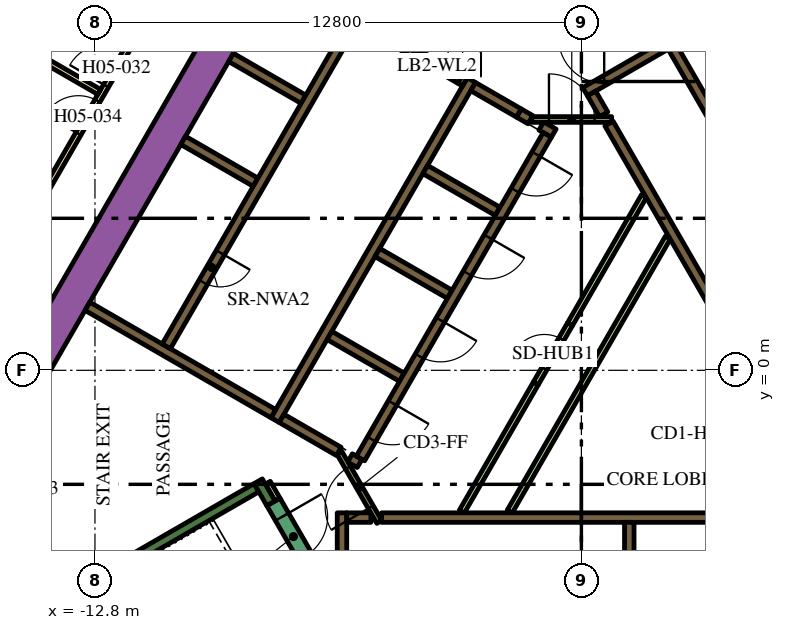
"""IFC4 building model, lengths in metres.
Left out: names, types, materials, properties, quantities, classifications, styles, units other than length and angle.
Written with IfcOpenShell. Run it as: python <this file> out.ifc"""

import sys

from ifc_helpers import new_model, si_unit, direction, frame, frame_2d, origin, place, context, subcontext, project, spatial, polyline, rectangle, outline, extrude, element, fill, save


model = new_model("IFC4")
c1 = context("Model", 3, precision=1e-05, world=origin(), true_north=direction((0.0, 1.0)))
c2 = subcontext(c1, "Body", "Model", "MODEL_VIEW")
j1 = project(units=[si_unit("LENGTHUNIT", "METRE"), si_unit("PLANEANGLEUNIT", "RADIAN")], contexts=[c1])
p1 = place(None, origin())
s1 = spatial("IfcSite", under=j1, at=p1, CompositionType="ELEMENT")
p2 = place(p1, origin())
s2 = spatial("IfcBuilding", under=s1, at=p2, CompositionType="ELEMENT")
p3 = place(p2, frame((0.0, 0.0, 74.4)))
s3 = spatial("IfcBuildingStorey", under=s2, at=p3, CompositionType="ELEMENT", Elevation=74.4)
p4 = place(p3, frame((-15.36, -1.503, 0.0), z_axis=(0.0, 0.0, 1.0), x_axis=(0.50000389221, 0.866023156604, 0.0)))
e1 = element("IfcWall", 1, at=p4, inside=s3, PredefinedType="SOLIDWALL", context=c2, shape_type="SweptSolid", body=[
    extrude(rectangle(XDim=21.0, YDim=0.9, at=frame_2d((10.5, 0.0))), origin(), (0.0, 0.0, 1.0), 3.9),
])
p5 = place(p3, frame((-12.134, -11.883, 0.0), z_axis=(0.0, 0.0, 1.0), x_axis=(-0.500005339912, 0.866022320763, 0.0)))
e2 = element("IfcWall", 2, at=p5, inside=s3, PredefinedType="SOLIDWALL", context=c2, shape_type="SweptSolid", body=[
    extrude(rectangle(XDim=9.488, YDim=0.9, at=frame_2d((4.744, 0.0))), origin(), (0.0, 0.0, 1.0), 3.9),
])
p6 = place(p3, frame((-14.44, -6.49, 0.0), z_axis=(0.0, 0.0, 1.0), x_axis=(0.866022966069, 0.500004222222, 0.0)))
e3 = element("IfcWall", 3, at=p6, inside=s3, PredefinedType="SOLIDWALL", context=c2, shape_type="SweptSolid", body=[
    extrude(rectangle(XDim=6.8, YDim=0.25, at=frame_2d((3.4, 0.0))), origin(), (0.0, 0.0, 1.0), 3.9),
])
p7 = place(p3, frame((-8.168, -3.503, 0.0), z_axis=(0.0, 0.0, 1.0), x_axis=(-0.499952099219, 0.866053057547, 0.0)))
e4 = element("IfcWall", 4, at=p7, inside=s3, PredefinedType="SOLIDWALL", context=c2, shape_type="SweptSolid", body=[
    extrude(rectangle(XDim=0.675, YDim=0.25, at=frame_2d((0.337, 0.0))), origin(), (0.0, 0.0, 1.0), 3.9),
])
p8 = place(p3, frame((-5.259, -3.875, 0.0), z_axis=(0.0, 0.0, 1.0), x_axis=(1.0, 0.0, 0.0)))
e5 = element("IfcWall", 5, at=p8, inside=s3, PredefinedType="SOLIDWALL", context=c2, shape_type="SweptSolid", body=[
    extrude(rectangle(XDim=10.489, YDim=0.25, at=frame_2d((5.244, 0.0))), origin(), (0.0, 0.0, 1.0), 3.9),
])
p9 = place(p3, frame((1.26, -4.0, 0.0), z_axis=(0.0, 0.0, 1.0), x_axis=(0.0, -1.0, 0.0)))
e6 = element("IfcWall", 6, at=p9, inside=s3, PredefinedType="SOLIDWALL", context=c2, shape_type="SweptSolid", body=[
    extrude(rectangle(XDim=2.2, YDim=0.25, at=frame_2d((1.1, 0.0))), origin(), (0.0, 0.0, 1.0), 3.9),
])
p10 = place(p3, frame((-6.3, -7.035, 0.0), z_axis=(0.0, 0.0, 1.0), x_axis=(0.0, 1.0, 0.0)))
e7 = element("IfcWall", 7, at=p10, inside=s3, PredefinedType="SOLIDWALL", context=c2, shape_type="SweptSolid", body=[
    extrude(rectangle(XDim=3.285, YDim=0.25, at=frame_2d((1.643, 0.0))), origin(), (0.0, 0.0, 1.0), 3.9),
])
p11 = place(p3, frame((-6.175, -3.875, 0.0), z_axis=(0.0, 0.0, 1.0), x_axis=(1.0, 0.0, 0.0)))
e8 = element("IfcWall", 8, at=p11, inside=s3, PredefinedType="SOLIDWALL", context=c2, shape_type="SweptSolid", body=[
    extrude(rectangle(XDim=0.637, YDim=0.25, at=frame_2d((0.318, 0.0))), origin(), (0.0, 0.0, 1.0), 3.9),
])
p12 = place(p3, frame((0.098, 7.331, 0.0), z_axis=(0.0, 0.0, 1.0), x_axis=(0.865988154826, 0.50006451154, 0.0)))
e9 = element("IfcWall", 9, at=p12, inside=s3, PredefinedType="SOLIDWALL", context=c2, shape_type="SweptSolid", body=[
    extrude(rectangle(XDim=3.398, YDim=0.25, at=frame_2d((1.699, 0.0))), origin(), (0.0, 0.0, 1.0), 3.9),
])
p13 = place(p3, frame((0.268, 7.285, 0.0), z_axis=(0.0, 0.0, 1.0), x_axis=(0.500098681536, -0.865968422476, 0.0)))
e10 = element("IfcWall", 10, at=p13, inside=s3, PredefinedType="SOLIDWALL", context=c2, shape_type="SweptSolid", body=[
    extrude(rectangle(XDim=0.636, YDim=0.25, at=frame_2d((0.318, 0.0))), origin(), (0.0, 0.0, 1.0), 3.9),
])
p14 = place(p3, frame((5.97, -2.591, 0.0), z_axis=(0.0, 0.0, 1.0), x_axis=(-0.499994469932, 0.866028596547, 0.0)))
e11 = element("IfcWall", 11, at=p14, inside=s3, PredefinedType="SOLIDWALL", context=c2, shape_type="SweptSolid", body=[
    extrude(rectangle(XDim=10.488, YDim=0.25, at=frame_2d((5.244, 0.0))), origin(), (0.0, 0.0, 1.0), 3.9),
])
p15 = place(p3, frame((-8.06, -1.311, 0.0), z_axis=(0.0, 0.0, 1.0), x_axis=(0.50000273126, 0.866023826885, 0.0)))
e12 = element("IfcWall", 12, at=p15, inside=s3, PredefinedType="SOLIDWALL", context=c2, shape_type="SweptSolid", body=[
    extrude(rectangle(XDim=10.33, YDim=0.25, at=frame_2d((5.165, 0.0))), origin(), (0.0, 0.0, 1.0), 3.9),
])
p16 = place(p3, frame((-1.342, 6.595, 0.0), z_axis=(0.0, 0.0, 1.0), x_axis=(-0.866046247233, 0.49996389635, 0.0)))
e13 = element("IfcWall", 13, at=p16, inside=s3, PredefinedType="SOLIDWALL", context=c2, shape_type="SweptSolid", body=[
    extrude(rectangle(XDim=0.35, YDim=0.25, at=frame_2d((0.175, 0.0))), origin(), (0.0, 0.0, 1.0), 3.9),
])
p17 = place(p3, frame((-1.647, 6.771, 0.0), z_axis=(0.0, 0.0, 1.0), x_axis=(-0.865971728693, 0.500092956464, 0.0)))
e14 = element("IfcWall", 14, at=p17, inside=s3, PredefinedType="SOLIDWALL", context=c2, shape_type="SweptSolid", body=[
    extrude(rectangle(XDim=1.388, YDim=0.25, at=frame_2d((0.694, 0.0))), origin(), (0.0, 0.0, 1.0), 3.9),
])
p18 = place(p3, frame((-0.728, 6.24, 0.0), z_axis=(0.0, 0.0, 1.0), x_axis=(-0.866088799389, 0.499890179513, 0.0)))
e15 = element("IfcWall", 15, at=p18, inside=s3, PredefinedType="SOLIDWALL", context=c2, shape_type="SweptSolid", body=[
    extrude(rectangle(XDim=0.378, YDim=0.25, at=frame_2d((0.189, 0.0))), origin(), (0.0, 0.0, 1.0), 3.9),
])
for number, where, z_axis, x_axis in (
    (16, (-2.204, 4.182, 0.0), (0.0, 0.0, 1.0), (-0.866, 0.5, 0.0)),
    (17, (-5.369, 3.1, 0.0), (0.0, 0.0, 1.0), (0.866, -0.5, 0.0)),
    (18, (-4.724, -0.182, 0.0), (0.0, 0.0, 1.0), (-0.866, 0.5, 0.0)),
):
    element("IfcWall", number, at=place(p3, frame(where, z_axis=z_axis, x_axis=x_axis)), inside=s3, PredefinedType="SOLIDWALL", context=c2, shape_type="SweptSolid", body=[
        extrude(rectangle(XDim=2.2, YDim=0.25, at=frame_2d((1.1, 0.0))), origin(), (0.0, 0.0, 1.0), 3.9),
    ])
p19 = place(p3, frame((-6.088, -2.305, 0.0), z_axis=(0.0, 0.0, 1.0), x_axis=(0.866059450854, -0.499941024108, 0.0)))
e19 = element("IfcWall", 19, at=p19, inside=s3, PredefinedType="SOLIDWALL", context=c2, shape_type="SweptSolid", body=[
    extrude(rectangle(XDim=0.29, YDim=0.25, at=frame_2d((0.145, 0.0))), origin(), (0.0, 0.0, 1.0), 3.9),
])
p20 = place(p3, frame((-7.889, -1.265, 0.0), z_axis=(0.0, 0.0, 1.0), x_axis=(0.865986741702, -0.500066958712, 0.0)))
e20 = element("IfcWall", 20, at=p20, inside=s3, PredefinedType="SOLIDWALL", context=c2, shape_type="SweptSolid", body=[
    extrude(rectangle(XDim=1.738, YDim=0.25, at=frame_2d((0.869, 0.0))), origin(), (0.0, 0.0, 1.0), 3.9),
])
p21 = place(p3, frame((-8.106, -1.14, 0.0), z_axis=(0.0, 0.0, 1.0), x_axis=(-0.866000643155, 0.500042884217, 0.0)))
e21 = element("IfcWall", 21, at=p21, inside=s3, PredefinedType="SOLIDWALL", context=c2, shape_type="SweptSolid", body=[
    extrude(rectangle(XDim=5.65, YDim=0.25, at=frame_2d((2.825, 0.0))), origin(), (0.0, 0.0, 1.0), 3.9),
])
p22 = place(p3, origin())
e22 = element("IfcWall", 22, at=p22, inside=s3, PredefinedType="SOLIDWALL", context=c2, shape_type="SweptSolid", body=[
    extrude(outline(polyline([(-3.128, 7.481), (-3.259, 7.557), (-3.134, 7.773), (-3.003, 7.698), (-3.128, 7.481)])), origin(), (0.0, 0.0, 1.0), 3.9),
])
for number, where, z_axis, x_axis in (
    (23, (-8.574, 4.95, 0.0), (0.0, 0.0, 1.0), (-0.866, 0.5, 0.0)),
    (24, (-7.314, 7.132, 0.0), (0.0, 0.0, 1.0), (-0.866, 0.5, 0.0)),
):
    element("IfcWall", number, at=place(p3, frame(where, z_axis=z_axis, x_axis=x_axis)), inside=s3, PredefinedType="SOLIDWALL", context=c2, shape_type="SweptSolid", body=[
        extrude(rectangle(XDim=2.2, YDim=0.25, at=frame_2d((1.1, 0.0))), origin(), (0.0, 0.0, 1.0), 3.9),
    ])
p23 = place(p3, frame((-7.959, 10.415, 0.0), z_axis=(0.0, 0.0, 1.0), x_axis=(0.866020958405, -0.500007699544, 0.0)))
e25 = element("IfcWall", 25, at=p23, inside=s3, PredefinedType="SOLIDWALL", context=c2, shape_type="SweptSolid", body=[
    extrude(rectangle(XDim=4.1, YDim=0.25, at=frame_2d((2.05, 0.0))), origin(), (0.0, 0.0, 1.0), 3.9),
])
p24 = place(p3, frame((-8.252, -2.958, 0.0), z_axis=(0.0, 0.0, 1.0), x_axis=(0.500174715838, -0.865924508047, 0.0)))
e26 = element("IfcWall", 26, at=p24, inside=s3, PredefinedType="PARTITIONING", context=c2, shape_type="SweptSolid", body=[
    extrude(rectangle(XDim=0.514, YDim=0.15, at=frame_2d((0.257, 0.0))), origin(), (0.0, 0.0, 1.0), 2.7),
])
p25 = place(p3, frame((-3.147, -3.718, 0.0), z_axis=(0.0, 0.0, 1.0), x_axis=(0.500010131483, 0.866019554291, 0.0)))
e27 = element("IfcWall", 27, at=p25, inside=s3, PredefinedType="PARTITIONING", context=c2, shape_type="SweptSolid", body=[
    extrude(rectangle(XDim=3.894, YDim=0.15, at=frame_2d((1.947, 0.0))), origin(), (0.0, 0.0, 1.0), 2.7),
])
p26 = place(p3, frame((-1.887, -3.718, 0.0), z_axis=(0.0, 0.0, 1.0), x_axis=(0.500005008002, 0.866022512394, 0.0)))
e28 = element("IfcWall", 28, at=p26, inside=s3, PredefinedType="PARTITIONING", context=c2, shape_type="SweptSolid", body=[
    extrude(rectangle(XDim=8.327, YDim=0.15, at=frame_2d((4.164, 0.0))), origin(), (0.0, 0.0, 1.0), 2.7),
])
p27 = place(p3, frame((-0.3, 1.212, 0.0), z_axis=(0.0, 0.0, 1.0), x_axis=(0.499963101113, 0.866046706318, 0.0)))
e29 = element("IfcWall", 29, at=p27, inside=s3, PredefinedType="PARTITIONING", context=c2, shape_type="SweptSolid", body=[
    extrude(rectangle(XDim=3.893, YDim=0.15, at=frame_2d((1.947, 0.0))), origin(), (0.0, 0.0, 1.0), 2.7),
])
p28 = place(p3, frame((8.565, -2.185, 0.0), z_axis=(0.0, 0.0, 1.0), x_axis=(-0.499997954832, 0.866026584559, 0.0)))
e30 = element("IfcWall", 30, at=p28, inside=s3, PredefinedType="SOLIDWALL", context=c2, shape_type="SweptSolid", body=[
    extrude(rectangle(XDim=12.35, YDim=0.25, at=frame_2d((6.175, 0.0))), origin(), (0.0, 0.0, 1.0), 3.9),
])
p29 = place(p28, frame((5.725, 0.0, 0.0)))
e31 = element("IfcOpeningElement", 31, at=p29, cuts=e30, PredefinedType="OPENING", context=c2, shape_type="SweptSolid", body=[
    extrude(rectangle(XDim=0.9, YDim=2.1, at=frame_2d((0.45, 1.05))), frame((0.0, 0.135, 0.0), z_axis=(0.0, -1.0, 0.0), x_axis=(1.0, 0.0, 0.0)), (0.0, 0.0, 1.0), 0.27),
])
p30 = place(p3, frame((-6.008, 9.144, 0.0), z_axis=(0.0, 0.0, 1.0), x_axis=(-0.500006956611, -0.866021387346, 0.0)))
e32 = element("IfcWall", 32, at=p30, inside=s3, PredefinedType="SOLIDWALL", context=c2, shape_type="SweptSolid", body=[
    extrude(rectangle(XDim=9.83, YDim=0.25, at=frame_2d((4.915, 0.0))), origin(), (0.0, 0.0, 1.0), 3.9),
])
p31 = place(p30, frame((6.985, 0.0, 0.0)))
e33 = element("IfcOpeningElement", 33, at=p31, cuts=e32, PredefinedType="OPENING", context=c2, shape_type="SweptSolid", body=[
    extrude(rectangle(XDim=0.9, YDim=2.1, at=frame_2d((0.45, 1.05))), frame((0.0, 0.135, 0.0), z_axis=(0.0, -1.0, 0.0), x_axis=(1.0, 0.0, 0.0)), (0.0, 0.0, 1.0), 0.27),
])
p32 = place(p3, frame((-0.898, 6.194, 0.0), z_axis=(0.0, 0.0, 1.0), x_axis=(-0.499996202215, -0.866027596426, 0.0)))
e34 = element("IfcWall", 34, at=p32, inside=s3, PredefinedType="SOLIDWALL", context=c2, shape_type="SweptSolid", body=[
    extrude(rectangle(XDim=9.83, YDim=0.25, at=frame_2d((4.915, 0.0))), origin(), (0.0, 0.0, 1.0), 3.9),
])
p33 = place(p32, frame((0.585, 0.0, 0.0)))
e35 = element("IfcOpeningElement", 35, at=p33, cuts=e34, PredefinedType="OPENING", context=c2, shape_type="SweptSolid", body=[
    extrude(rectangle(XDim=1.1, YDim=2.1, at=frame_2d((0.55, 1.05))), frame((0.0, 0.135, 0.0), z_axis=(0.0, -1.0, 0.0), x_axis=(1.0, 0.0, 0.0)), (0.0, 0.0, 1.0), 0.27),
])
p34 = place(p32, frame((3.105, 0.0, 0.0)))
e36 = element("IfcOpeningElement", 36, at=p34, cuts=e34, PredefinedType="OPENING", context=c2, shape_type="SweptSolid", body=[
    extrude(rectangle(XDim=1.1, YDim=2.1, at=frame_2d((0.55, 1.05))), frame((0.0, 0.135, 0.0), z_axis=(0.0, -1.0, 0.0), x_axis=(1.0, 0.0, 0.0)), (0.0, 0.0, 1.0), 0.27),
])
p35 = place(p32, frame((5.625, 0.0, 0.0)))
e37 = element("IfcOpeningElement", 37, at=p35, cuts=e34, PredefinedType="OPENING", context=c2, shape_type="SweptSolid", body=[
    extrude(rectangle(XDim=1.1, YDim=2.1, at=frame_2d((0.55, 1.05))), frame((0.0, 0.135, 0.0), z_axis=(0.0, -1.0, 0.0), x_axis=(1.0, 0.0, 0.0)), (0.0, 0.0, 1.0), 0.27),
])
p36 = place(p32, frame((8.145, 0.0, 0.0)))
e38 = element("IfcOpeningElement", 38, at=p36, cuts=e34, PredefinedType="OPENING", context=c2, shape_type="SweptSolid", body=[
    extrude(rectangle(XDim=1.1, YDim=2.1, at=frame_2d((0.55, 1.05))), frame((0.0, 0.135, 0.0), z_axis=(0.0, -1.0, 0.0), x_axis=(1.0, 0.0, 0.0)), (0.0, 0.0, 1.0), 0.27),
])
p37 = place(p3, frame((-8.103, -3.466, 0.0), z_axis=(0.0, 0.0, 1.0), x_axis=(0.500078061341, -0.865980330357, 0.0)))
e39 = element("IfcWall", 39, at=p37, inside=s3, PredefinedType="SOLIDWALL", context=c2, shape_type="SweptSolid", body=[
    extrude(rectangle(XDim=2.1, YDim=0.4, at=frame_2d((1.05, 0.0))), origin(), (0.0, 0.0, 1.0), 3.9),
])
p38 = place(p37, frame((0.45, 0.0, 0.0)))
e40 = element("IfcOpeningElement", 40, at=p38, cuts=e39, PredefinedType="OPENING", context=c2, shape_type="SweptSolid", body=[
    extrude(rectangle(XDim=1.2, YDim=2.1, at=frame_2d((0.6, 1.05))), frame((0.0, 0.21, 0.0), z_axis=(0.0, -1.0, 0.0), x_axis=(1.0, 0.0, 0.0)), (0.0, 0.0, 1.0), 0.42),
])
p39 = place(p3, frame((-1.303, 6.6, 0.0), z_axis=(0.0, 0.0, 1.0), x_axis=(1.0, 0.0, 0.0)))
e41 = element("IfcWall", 41, at=p39, inside=s3, PredefinedType="PARTITIONING", context=c2, shape_type="SweptSolid", body=[
    extrude(rectangle(XDim=2.1, YDim=0.15, at=frame_2d((1.05, 0.0))), origin(), (0.0, 0.0, 1.0), 3.9),
])
p40 = place(p39, frame((0.45, 0.0, 0.0)))
e42 = element("IfcOpeningElement", 42, at=p40, cuts=e41, PredefinedType="OPENING", context=c2, shape_type="SweptSolid", body=[
    extrude(rectangle(XDim=1.2, YDim=2.1, at=frame_2d((0.6, 1.05))), frame((0.0, 0.085, 0.0), z_axis=(0.0, -1.0, 0.0), x_axis=(1.0, 0.0, 0.0)), (0.0, 0.0, 1.0), 0.17),
])
p41 = place(p3, frame((-5.317, -3.99, 0.0), z_axis=(0.0, 0.0, 1.0), x_axis=(-0.500027713859, 0.866009402589, 0.0)))
e43 = element("IfcWall", 43, at=p41, inside=s3, PredefinedType="PARTITIONING", context=c2, shape_type="SweptSolid", body=[
    extrude(rectangle(XDim=2.1, YDim=0.15, at=frame_2d((1.05, 0.0))), origin(), (0.0, 0.0, 1.0), 3.9),
])
p42 = place(p41, frame((0.45, 0.0, 0.0)))
e44 = element("IfcOpeningElement", 44, at=p42, cuts=e43, PredefinedType="OPENING", context=c2, shape_type="SweptSolid", body=[
    extrude(rectangle(XDim=1.2, YDim=2.1, at=frame_2d((0.6, 1.05))), frame((0.0, 0.085, 0.0), z_axis=(0.0, -1.0, 0.0), x_axis=(1.0, 0.0, 0.0)), (0.0, 0.0, 1.0), 0.17),
])
p43 = place(p3, frame((-4.409, 8.365, 0.0), z_axis=(0.0, 0.0, 1.0), x_axis=(0.866034573852, -0.49998411664, 0.0)))
e45 = element("IfcWall", 45, at=p43, inside=s3, PredefinedType="SOLIDWALL", context=c2, shape_type="SweptSolid", body=[
    extrude(rectangle(XDim=1.4, YDim=0.25, at=frame_2d((0.7, 0.0))), origin(), (0.0, 0.0, 1.0), 3.9),
])
p44 = place(p43, frame((0.1, 0.0, 0.0)))
e46 = element("IfcOpeningElement", 46, at=p44, cuts=e45, PredefinedType="OPENING", context=c2, shape_type="SweptSolid", body=[
    extrude(rectangle(XDim=1.2, YDim=2.1, at=frame_2d((0.6, 1.05))), frame((0.0, 0.135, 0.0), z_axis=(0.0, -1.0, 0.0), x_axis=(1.0, 0.0, 0.0)), (0.0, 0.0, 1.0), 0.27),
])
p45 = place(p3, frame((-1.2, -0.346, 0.0), z_axis=(0.0, 0.0, 1.0), x_axis=(0.499961193289, 0.866047807691, 0.0)))
e47 = element("IfcWall", 47, at=p45, inside=s3, PredefinedType="PARTITIONING", context=c2, shape_type="SweptSolid", body=[
    extrude(rectangle(XDim=1.8, YDim=0.15, at=frame_2d((0.9, 0.0))), origin(), (0.0, 0.0, 1.0), 2.7),
])
p46 = place(p45, frame((0.45, 0.0, 0.0)))
e48 = element("IfcOpeningElement", 48, at=p46, cuts=e47, PredefinedType="OPENING", context=c2, shape_type="SweptSolid", body=[
    extrude(rectangle(XDim=0.9, YDim=2.1, at=frame_2d((0.45, 1.05))), frame((0.0, 0.085, 0.0), z_axis=(0.0, -1.0, 0.0), x_axis=(1.0, 0.0, 0.0)), (0.0, 0.0, 1.0), 0.17),
])
p47 = place(p3, frame((-19.081, -3.9, 0.0), z_axis=(0.0, 0.0, 1.0), x_axis=(0.499998313975, 0.866026377209, 0.0)))
e49 = element("IfcWall", 49, at=p47, inside=s3, PredefinedType="PARTITIONING", context=c2, shape_type="SweptSolid", body=[
    extrude(rectangle(XDim=25.766, YDim=0.15, at=frame_2d((12.883, 0.0))), origin(), (0.0, 0.0, 1.0), 2.7),
])
p48 = place(p47, frame((24.265, 0.0, 0.0)))
e50 = element("IfcOpeningElement", 50, at=p48, cuts=e49, PredefinedType="OPENING", context=c2, shape_type="SweptSolid", body=[
    extrude(rectangle(XDim=1.0, YDim=2.1, at=frame_2d((0.5, 1.05))), frame((0.0, 0.085, 0.0), z_axis=(0.0, -1.0, 0.0), x_axis=(1.0, 0.0, 0.0)), (0.0, 0.0, 1.0), 0.17),
])
p49 = place(p47, frame((13.146, 0.0, 0.0)))
e51 = element("IfcOpeningElement", 51, at=p49, cuts=e49, PredefinedType="OPENING", context=c2, shape_type="SweptSolid", body=[
    extrude(rectangle(XDim=1.1, YDim=2.1, at=frame_2d((0.55, 1.05))), frame((0.0, 0.085, 0.0), z_axis=(0.0, -1.0, 0.0), x_axis=(1.0, 0.0, 0.0)), (0.0, 0.0, 1.0), 0.17),
])
p50 = place(p47, frame((11.693, 0.0, 0.0)))
e52 = element("IfcOpeningElement", 52, at=p50, cuts=e49, PredefinedType="OPENING", context=c2, shape_type="SweptSolid", body=[
    extrude(rectangle(XDim=1.0, YDim=2.1, at=frame_2d((0.5, 1.05))), frame((0.0, 0.085, 0.0), z_axis=(0.0, -1.0, 0.0), x_axis=(1.0, 0.0, 0.0)), (0.0, 0.0, 1.0), 0.17),
])
p51 = place(p47, frame((0.18, 0.0, 0.0)))
e53 = element("IfcOpeningElement", 53, at=p51, cuts=e49, PredefinedType="OPENING", context=c2, shape_type="SweptSolid", body=[
    extrude(rectangle(XDim=1.0, YDim=2.1, at=frame_2d((0.5, 1.05))), frame((0.0, 0.085, 0.0), z_axis=(0.0, -1.0, 0.0), x_axis=(1.0, 0.0, 0.0)), (0.0, 0.0, 1.0), 0.17),
])
p52 = place(p3, frame((-19.982, 11.537, 0.0), z_axis=(0.0, 0.0, 1.0), x_axis=(0.866020994654, -0.500007636761, 0.0)))
e54 = element("IfcWall", 54, at=p52, inside=s3, PredefinedType="PARTITIONING", context=c2, shape_type="SweptSolid", body=[
    extrude(rectangle(XDim=8.423, YDim=0.15, at=frame_2d((4.211, 0.0))), origin(), (0.0, 0.0, 1.0), 2.7),
])
p53 = place(p31, origin())
e55 = element("IfcDoor", 55, at=p53, inside=s3, OperationType="SINGLE_SWING_LEFT", PredefinedType="DOOR", context=c2, shape_type="SweptSolid", body=[
    extrude(rectangle(XDim=0.9, YDim=2.1, at=frame_2d((0.45, 1.05))), frame((0.0, 0.025, 0.0), z_axis=(0.0, -1.0, 0.0), x_axis=(1.0, 0.0, 0.0)), (0.0, 0.0, 1.0), 0.05),
])
fill(e33, e55)
p54 = place(p33, origin())
e56 = element("IfcDoor", 56, at=p54, inside=s3, OperationType="DOUBLE_DOOR_SLIDING", PredefinedType="DOOR", context=c2, shape_type="SweptSolid", body=[
    extrude(rectangle(XDim=1.1, YDim=2.1, at=frame_2d((0.55, 1.05))), frame((0.0, 0.025, 0.0), z_axis=(0.0, -1.0, 0.0), x_axis=(1.0, 0.0, 0.0)), (0.0, 0.0, 1.0), 0.05),
])
fill(e35, e56)
p55 = place(p34, origin())
e57 = element("IfcDoor", 57, at=p55, inside=s3, OperationType="DOUBLE_DOOR_SLIDING", PredefinedType="DOOR", context=c2, shape_type="SweptSolid", body=[
    extrude(rectangle(XDim=1.1, YDim=2.1, at=frame_2d((0.55, 1.05))), frame((0.0, 0.025, 0.0), z_axis=(0.0, -1.0, 0.0), x_axis=(1.0, 0.0, 0.0)), (0.0, 0.0, 1.0), 0.05),
])
fill(e36, e57)
p56 = place(p35, origin())
e58 = element("IfcDoor", 58, at=p56, inside=s3, OperationType="DOUBLE_DOOR_SLIDING", PredefinedType="DOOR", context=c2, shape_type="SweptSolid", body=[
    extrude(rectangle(XDim=1.1, YDim=2.1, at=frame_2d((0.55, 1.05))), frame((0.0, 0.025, 0.0), z_axis=(0.0, -1.0, 0.0), x_axis=(1.0, 0.0, 0.0)), (0.0, 0.0, 1.0), 0.05),
])
fill(e37, e58)
p57 = place(p36, origin())
e59 = element("IfcDoor", 59, at=p57, inside=s3, OperationType="DOUBLE_DOOR_SLIDING", PredefinedType="DOOR", context=c2, shape_type="SweptSolid", body=[
    extrude(rectangle(XDim=1.1, YDim=2.1, at=frame_2d((0.55, 1.05))), frame((0.0, 0.025, 0.0), z_axis=(0.0, -1.0, 0.0), x_axis=(1.0, 0.0, 0.0)), (0.0, 0.0, 1.0), 0.05),
])
fill(e38, e59)
p58 = place(p38, origin())
e60 = element("IfcDoor", 60, at=p58, inside=s3, OperationType="SINGLE_SWING_LEFT", PredefinedType="DOOR", context=c2, shape_type="SweptSolid", body=[
    extrude(rectangle(XDim=1.2, YDim=2.1, at=frame_2d((0.6, 1.05))), frame((0.0, 0.025, 0.0), z_axis=(0.0, -1.0, 0.0), x_axis=(1.0, 0.0, 0.0)), (0.0, 0.0, 1.0), 0.05),
])
fill(e40, e60)
p59 = place(p40, origin())
e61 = element("IfcDoor", 61, at=p59, inside=s3, OperationType="SINGLE_SWING_LEFT", PredefinedType="DOOR", context=c2, shape_type="SweptSolid", body=[
    extrude(rectangle(XDim=1.2, YDim=2.1, at=frame_2d((0.6, 1.05))), frame((0.0, 0.025, 0.0), z_axis=(0.0, -1.0, 0.0), x_axis=(1.0, 0.0, 0.0)), (0.0, 0.0, 1.0), 0.05),
])
fill(e42, e61)
p60 = place(p42, origin())
e62 = element("IfcDoor", 62, at=p60, inside=s3, OperationType="SINGLE_SWING_LEFT", PredefinedType="DOOR", context=c2, shape_type="SweptSolid", body=[
    extrude(rectangle(XDim=1.2, YDim=2.1, at=frame_2d((0.6, 1.05))), frame((0.0, 0.025, 0.0), z_axis=(0.0, -1.0, 0.0), x_axis=(1.0, 0.0, 0.0)), (0.0, 0.0, 1.0), 0.05),
])
fill(e44, e62)
p61 = place(p44, origin())
e63 = element("IfcDoor", 63, at=p61, inside=s3, OperationType="SINGLE_SWING_LEFT", PredefinedType="DOOR", context=c2, shape_type="SweptSolid", body=[
    extrude(rectangle(XDim=1.2, YDim=2.1, at=frame_2d((0.6, 1.05))), frame((0.0, 0.025, 0.0), z_axis=(0.0, -1.0, 0.0), x_axis=(1.0, 0.0, 0.0)), (0.0, 0.0, 1.0), 0.05),
])
fill(e46, e63)
p62 = place(p46, origin())
e64 = element("IfcDoor", 64, at=p62, inside=s3, OperationType="SINGLE_SWING_LEFT", PredefinedType="DOOR", context=c2, shape_type="SweptSolid", body=[
    extrude(rectangle(XDim=0.9, YDim=2.1, at=frame_2d((0.45, 1.05))), frame((0.0, 0.025, 0.0), z_axis=(0.0, -1.0, 0.0), x_axis=(1.0, 0.0, 0.0)), (0.0, 0.0, 1.0), 0.05),
])
fill(e48, e64)
p63 = place(p49, origin())
e65 = element("IfcDoor", 65, at=p63, inside=s3, OperationType="SINGLE_SWING_LEFT", PredefinedType="DOOR", context=c2, shape_type="SweptSolid", body=[
    extrude(rectangle(XDim=1.1, YDim=2.1, at=frame_2d((0.55, 1.05))), frame((0.0, 0.025, 0.0), z_axis=(0.0, -1.0, 0.0), x_axis=(1.0, 0.0, 0.0)), (0.0, 0.0, 1.0), 0.05),
])
fill(e51, e65)
p64 = place(p50, origin())
e66 = element("IfcDoor", 66, at=p64, inside=s3, OperationType="SINGLE_SWING_RIGHT", PredefinedType="DOOR", context=c2, shape_type="SweptSolid", body=[
    extrude(rectangle(XDim=1.0, YDim=2.1, at=frame_2d((0.5, 1.05))), frame((0.0, 0.025, 0.0), z_axis=(0.0, -1.0, 0.0), x_axis=(1.0, 0.0, 0.0)), (0.0, 0.0, 1.0), 0.05),
])
fill(e52, e66)
save(model, sys.argv[1])
